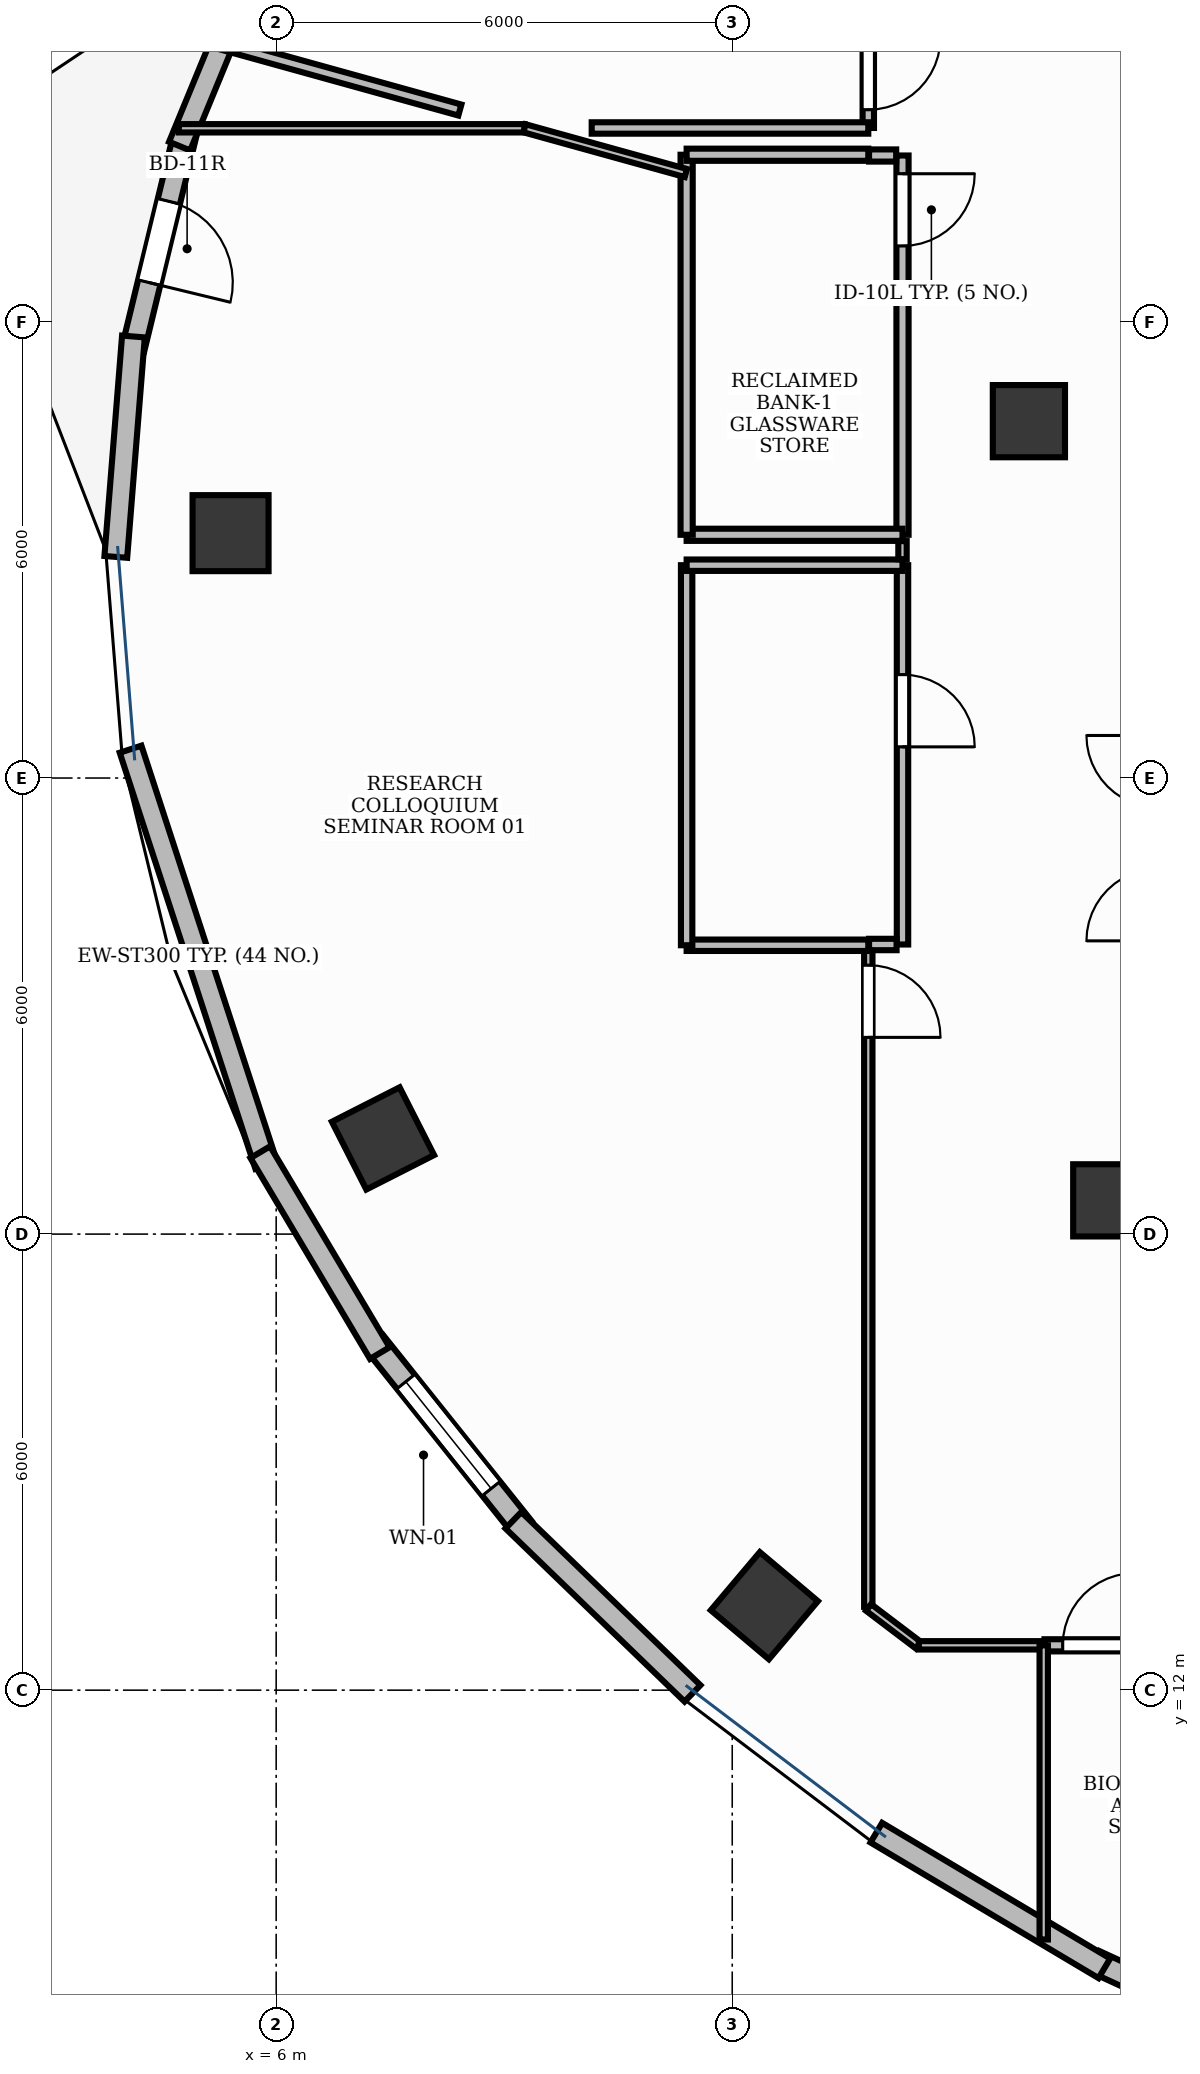
"""IFC4 building model, lengths in metres.
Left out: names, types, materials, properties, quantities, classifications, styles, units other than length and angle.
Written with IfcOpenShell. Run it as: python <this file> out.ifc"""

import sys

from ifc_helpers import new_model, si_unit, direction, frame, frame_2d, origin, origin_2d, place, context, subcontext, project, spatial, rectangle, extrude, element, fill, save


model = new_model("IFC4")
c1 = context("Model", 3, precision=1e-05, world=origin(), true_north=direction((0.0, 1.0)))
c2 = subcontext(c1, "Body", "Model", "MODEL_VIEW")
j1 = project(units=[si_unit("LENGTHUNIT", "METRE"), si_unit("PLANEANGLEUNIT", "RADIAN")], contexts=[c1])
p1 = place(None, origin())
s1 = spatial("IfcSite", under=j1, at=p1, CompositionType="ELEMENT")
p2 = place(p1, origin())
s2 = spatial("IfcBuilding", under=s1, at=p2, CompositionType="ELEMENT")
p3 = place(p2, frame((0.0, 0.0, 231.0)))
s3 = spatial("IfcBuildingStorey", under=s2, at=p3, CompositionType="ELEMENT", Elevation=231.0)
p4 = place(p3, frame((5.4, 27.222, -0.0), z_axis=(0.0, 0.0, 1.0), x_axis=(0.0, 1.0, 0.0)))
e1 = element("IfcColumn", 1, at=p4, inside=s3, PredefinedType="COLUMN", context=c2, shape_type="SweptSolid", body=[
    extrude(rectangle(XDim=1.0, YDim=1.0, at=origin_2d()), origin(), (0.0, 0.0, 1.0), 3.901),
])
p5 = place(p3, frame((15.903, 28.695, -0.0), z_axis=(0.0, 0.0, 1.0), x_axis=(1.0, 0.0, 0.0)))
e2 = element("IfcColumn", 2, at=p5, inside=s3, PredefinedType="COLUMN", context=c2, shape_type="SweptSolid", body=[
    extrude(rectangle(XDim=0.95, YDim=0.95, at=origin_2d()), origin(), (0.0, 0.0, 1.0), 3.901),
])
p6 = place(p3, frame((7.405, 19.259, -0.0), z_axis=(0.0, 0.0, 1.0), x_axis=(-0.453057191132, 0.891481453292, 0.0)))
e3 = element("IfcColumn", 3, at=p6, inside=s3, PredefinedType="COLUMN", context=c2, shape_type="SweptSolid", body=[
    extrude(rectangle(XDim=1.0, YDim=1.0, at=origin_2d()), origin(), (0.0, 0.0, 1.0), 3.901),
])
p7 = place(p3, frame((16.96, 18.444, -0.0), z_axis=(0.0, 0.0, 1.0), x_axis=(1.0, 0.0, 0.0)))
e4 = element("IfcColumn", 4, at=p7, inside=s3, PredefinedType="COLUMN", context=c2, shape_type="SweptSolid", body=[
    extrude(rectangle(XDim=0.95, YDim=0.95, at=origin_2d()), origin(), (0.0, 0.0, 1.0), 3.901),
])
p8 = place(p3, frame((12.423, 13.111, -0.0), z_axis=(0.0, 0.0, 1.0), x_axis=(-0.764246456939, 0.644924300253, 0.0)))
e5 = element("IfcColumn", 5, at=p8, inside=s3, PredefinedType="COLUMN", context=c2, shape_type="SweptSolid", body=[
    extrude(rectangle(XDim=1.0, YDim=1.0, at=origin_2d()), origin(), (0.0, 0.0, 1.0), 3.901),
])
p9 = place(p3, frame((4.8, 32.461, 0.0), z_axis=(0.0, 0.0, 1.0), x_axis=(-0.23549395731, -0.971875813091, 0.0)))
e6 = element("IfcWall", 6, at=p9, inside=s3, PredefinedType="STANDARD", context=c2, shape_type="SweptSolid", body=[
    extrude(rectangle(XDim=2.899, YDim=0.3, at=frame_2d((1.449, 0.0))), origin(), (0.0, 0.0, 1.0), 3.9),
])
p10 = place(p9, frame((0.899, 0.0, 0.0)))
e7 = element("IfcOpeningElement", 7, at=p10, cuts=e6, PredefinedType="OPENING", context=c2, shape_type="SweptSolid", body=[
    extrude(rectangle(XDim=1.1, YDim=2.15, at=frame_2d((0.55, 1.075))), frame((0.0, 0.165, 0.0), z_axis=(0.0, -1.0, 0.0), x_axis=(1.0, 0.0, 0.0)), (0.0, 0.0, 1.0), 0.33),
])
p11 = place(p3, frame((7.29, 16.579, 0.0), z_axis=(0.0, 0.0, 1.0), x_axis=(0.624095877763, -0.781347768512, 0.0)))
e8 = element("IfcWall", 8, at=p11, inside=s3, PredefinedType="STANDARD", context=c2, shape_type="SweptSolid", body=[
    extrude(rectangle(XDim=3.132, YDim=0.3, at=frame_2d((1.566, 0.0))), origin(), (0.0, 0.0, 1.0), 3.9),
])
p12 = place(p11, frame((0.666, 0.0, 0.9)))
e9 = element("IfcOpeningElement", 9, at=p12, cuts=e8, PredefinedType="OPENING", context=c2, shape_type="SweptSolid", body=[
    extrude(rectangle(XDim=1.8, YDim=2.1, at=frame_2d((0.9, 1.05))), frame((0.0, 0.165, 0.0), z_axis=(0.0, -1.0, 0.0), x_axis=(1.0, 0.0, 0.0)), (0.0, 0.0, 1.0), 0.33),
])
p13 = place(p3, frame((16.768, 8.432, 0.0), z_axis=(0.0, 0.0, 1.0), x_axis=(0.908478431596, -0.41793174003, 0.0)))
e10 = element("IfcWall", 10, at=p13, inside=s3, PredefinedType="STANDARD", context=c2, shape_type="SweptSolid", body=[
    extrude(rectangle(XDim=3.547, YDim=0.3, at=frame_2d((1.773, 0.0))), origin(), (0.0, 0.0, 1.0), 3.9),
])
p14 = place(p13, frame((1.534, 0.0, 0.9)))
e11 = element("IfcOpeningElement", 11, at=p14, cuts=e10, PredefinedType="OPENING", context=c2, shape_type="SweptSolid", body=[
    extrude(rectangle(XDim=1.8, YDim=2.1, at=frame_2d((0.9, 1.05))), frame((0.0, 0.165, 0.0), z_axis=(0.0, -1.0, 0.0), x_axis=(1.0, 0.0, 0.0)), (0.0, 0.0, 1.0), 0.33),
])
p15 = place(p3, frame((5.871, 35.083, 0.0), z_axis=(0.0, 0.0, 1.0), x_axis=(-0.380967021775, -0.924588626536, 0.0)))
e12 = element("IfcWall", 12, at=p15, inside=s3, PredefinedType="STANDARD", context=c2, shape_type="SweptSolid", body=[
    extrude(rectangle(XDim=2.996, YDim=0.3, at=frame_2d((1.498, 0.0))), origin(), (0.0, 0.0, 1.0), 3.9),
])
p16 = place(p3, frame((4.122, 29.809, 0.0), z_axis=(0.0, 0.0, 1.0), x_axis=(-0.079738550157, -0.996815812284, 0.0)))
e13 = element("IfcWall", 13, at=p16, inside=s3, PredefinedType="STANDARD", context=c2, shape_type="SweptSolid", body=[
    extrude(rectangle(XDim=2.909, YDim=0.3, at=frame_2d((1.454, 0.0))), origin(), (0.0, 0.0, 1.0), 3.9),
])
p17 = place(p3, frame((4.084, 24.379, 0.0), z_axis=(0.0, 0.0, 1.0), x_axis=(0.309937285623, -0.95075700312, 0.0)))
e14 = element("IfcWall", 14, at=p17, inside=s3, PredefinedType="STANDARD", context=c2, shape_type="SweptSolid", body=[
    extrude(rectangle(XDim=5.758, YDim=0.3, at=frame_2d((2.879, 0.0))), origin(), (0.0, 0.0, 1.0), 3.9),
])
p18 = place(p3, frame((5.791, 19.078, 0.0), z_axis=(0.0, 0.0, 1.0), x_axis=(0.511305212285, -0.85939919705, 0.0)))
e15 = element("IfcWall", 15, at=p18, inside=s3, PredefinedType="STANDARD", context=c2, shape_type="SweptSolid", body=[
    extrude(rectangle(XDim=3.075, YDim=0.3, at=frame_2d((1.538, 0.0))), origin(), (0.0, 0.0, 1.0), 3.47),
])
p19 = place(p3, frame((9.121, 14.235, 0.0), z_axis=(0.0, 0.0, 1.0), x_axis=(0.718999544538, -0.695010543052, 0.0)))
e16 = element("IfcWall", 16, at=p19, inside=s3, PredefinedType="STANDARD", context=c2, shape_type="SweptSolid", body=[
    extrude(rectangle(XDim=3.277, YDim=0.3, at=frame_2d((1.639, 0.0))), origin(), (0.0, 0.0, 1.0), 3.47),
])
p20 = place(p3, frame((13.896, 10.125, 0.0), z_axis=(0.0, 0.0, 1.0), x_axis=(0.859467780744, -0.511189919563, 0.0)))
e17 = element("IfcWall", 17, at=p20, inside=s3, PredefinedType="STANDARD", context=c2, shape_type="SweptSolid", body=[
    extrude(rectangle(XDim=3.49, YDim=0.3, at=frame_2d((1.745, 0.0))), origin(), (0.0, 0.0, 1.0), 3.9),
])
p21 = place(p3, frame((14.24, 26.8, 0.0), z_axis=(0.0, 0.0, 1.0), x_axis=(0.0, -1.0, 0.0)))
e18 = element("IfcWall", 18, at=p21, inside=s3, PredefinedType="PARTITIONING", context=c2, shape_type="SweptSolid", body=[
    extrude(rectangle(XDim=4.99, YDim=0.15, at=frame_2d((2.495, 0.0))), origin(), (0.0, 0.0, 1.0), 2.91),
])
p22 = place(p21, frame((1.44, 0.0, 0.0)))
e19 = element("IfcOpeningElement", 19, at=p22, cuts=e18, PredefinedType="OPENING", context=c2, shape_type="SweptSolid", body=[
    extrude(rectangle(XDim=0.95, YDim=2.15, at=frame_2d((0.475, 1.075))), frame((0.0, 0.09, 0.0), z_axis=(0.0, -1.0, 0.0), x_axis=(1.0, 0.0, 0.0)), (0.0, 0.0, 1.0), 0.18),
])
p23 = place(p3, frame((14.24, 32.19, 0.0), z_axis=(0.0, 0.0, 1.0), x_axis=(0.0, -1.0, 0.0)))
e20 = element("IfcWall", 20, at=p23, inside=s3, PredefinedType="PARTITIONING", context=c2, shape_type="SweptSolid", body=[
    extrude(rectangle(XDim=4.99, YDim=0.16, at=frame_2d((2.495, 0.0))), origin(), (0.0, 0.0, 1.0), 2.91),
])
p24 = place(p23, frame((0.24, 0.0, 0.0)))
e21 = element("IfcOpeningElement", 21, at=p24, cuts=e20, PredefinedType="OPENING", context=c2, shape_type="SweptSolid", body=[
    extrude(rectangle(XDim=0.95, YDim=2.15, at=frame_2d((0.475, 1.075))), frame((0.0, 0.095, 0.0), z_axis=(0.0, -1.0, 0.0), x_axis=(1.0, 0.0, 0.0)), (0.0, 0.0, 1.0), 0.19),
])
p25 = place(p3, frame((13.79, 21.79, 0.0), z_axis=(0.0, 0.0, 1.0), x_axis=(0.0, -1.0, 0.0)))
e22 = element("IfcWall", 22, at=p25, inside=s3, PredefinedType="MOVABLE", context=c2, shape_type="SweptSolid", body=[
    extrude(rectangle(XDim=8.694, YDim=0.11, at=frame_2d((4.347, 0.0))), origin(), (0.0, 0.0, 1.0), 2.91),
])
p26 = place(p25, frame((0.252, 0.0, 0.0)))
e23 = element("IfcOpeningElement", 23, at=p26, cuts=e22, PredefinedType="OPENING", context=c2, shape_type="SweptSolid", body=[
    extrude(rectangle(XDim=0.95, YDim=2.15, at=frame_2d((0.475, 1.075))), frame((0.0, 0.07, 0.0), z_axis=(0.0, -1.0, 0.0), x_axis=(1.0, 0.0, 0.0)), (0.0, 0.0, 1.0), 0.14),
])
p27 = place(p3, frame((16.108, 12.59, 0.0), z_axis=(0.0, 0.0, 1.0), x_axis=(1.0, 0.0, 0.0)))
e24 = element("IfcWall", 24, at=p27, inside=s3, PredefinedType="PARTITIONING", context=c2, shape_type="SweptSolid", body=[
    extrude(rectangle(XDim=4.58, YDim=0.16, at=frame_2d((2.29, 0.0))), origin(), (0.0, 0.0, 1.0), 2.91),
])
p28 = place(p27, frame((0.24, 0.0, 0.0)))
e25 = element("IfcOpeningElement", 25, at=p28, cuts=e24, PredefinedType="OPENING", context=c2, shape_type="SweptSolid", body=[
    extrude(rectangle(XDim=0.95, YDim=2.15, at=frame_2d((0.475, 1.075))), frame((0.0, 0.095, 0.0), z_axis=(0.0, -1.0, 0.0), x_axis=(1.0, 0.0, 0.0)), (0.0, 0.0, 1.0), 0.19),
])
p29 = place(p3, frame((13.79, 37.0, 0.0), z_axis=(0.0, 0.0, 1.0), x_axis=(0.0, -1.0, 0.0)))
e26 = element("IfcWall", 26, at=p29, inside=s3, PredefinedType="PARTITIONING", context=c2, shape_type="SweptSolid", body=[
    extrude(rectangle(XDim=4.448, YDim=0.15, at=frame_2d((2.224, 0.0))), origin(), (0.0, 0.0, 1.0), 2.91),
])
p30 = place(p29, frame((3.258, 0.0, 0.0)))
e27 = element("IfcOpeningElement", 27, at=p30, cuts=e26, PredefinedType="OPENING", context=c2, shape_type="SweptSolid", body=[
    extrude(rectangle(XDim=0.95, YDim=2.15, at=frame_2d((0.475, 1.075))), frame((0.0, 0.09, 0.0), z_axis=(0.0, -1.0, 0.0), x_axis=(1.0, 0.0, 0.0)), (0.0, 0.0, 1.0), 0.18),
])
p31 = place(p3, frame((14.162, 21.81, 0.0), z_axis=(0.0, 0.0, 1.0), x_axis=(-1.0, 0.0, 0.0)))
e28 = element("IfcWall", 28, at=p31, inside=s3, PredefinedType="PARTITIONING", context=c2, shape_type="SweptSolid", body=[
    extrude(rectangle(XDim=0.362, YDim=0.15, at=frame_2d((0.181, 0.0))), origin(), (0.0, 0.0, 1.0), 2.91),
])
p32 = place(p3, frame((13.79, 21.8, 0.0), z_axis=(0.0, 0.0, 1.0), x_axis=(-1.0, 0.0, 0.0)))
e29 = element("IfcWall", 29, at=p32, inside=s3, PredefinedType="PARTITIONING", context=c2, shape_type="SweptSolid", body=[
    extrude(rectangle(XDim=2.39, YDim=0.15, at=frame_2d((1.195, 0.0))), origin(), (0.0, 0.0, 1.0), 2.91),
])
p33 = place(p3, frame((11.4, 21.8, 0.0), z_axis=(0.0, 0.0, 1.0), x_axis=(0.0, 1.0, 0.0)))
e30 = element("IfcWall", 30, at=p33, inside=s3, PredefinedType="PARTITIONING", context=c2, shape_type="SweptSolid", body=[
    extrude(rectangle(XDim=5.0, YDim=0.15, at=frame_2d((2.5, 0.0))), origin(), (0.0, 0.0, 1.0), 2.91),
])
p34 = place(p3, frame((11.4, 26.8, 0.0), z_axis=(0.0, 0.0, 1.0), x_axis=(1.0, 0.0, 0.0)))
e31 = element("IfcWall", 31, at=p34, inside=s3, PredefinedType="PARTITIONING", context=c2, shape_type="SweptSolid", body=[
    extrude(rectangle(XDim=2.84, YDim=0.15, at=frame_2d((1.42, 0.0))), origin(), (0.0, 0.0, 1.0), 2.91),
])
p35 = place(p3, frame((13.8, 32.19, 0.0), z_axis=(0.0, 0.0, 1.0), x_axis=(1.0, 0.0, 0.0)))
e32 = element("IfcWall", 32, at=p35, inside=s3, PredefinedType="PARTITIONING", context=c2, shape_type="SweptSolid", body=[
    extrude(rectangle(XDim=0.357, YDim=0.16, at=frame_2d((0.178, 0.0))), origin(), (0.0, 0.0, 1.0), 2.91),
])
p36 = place(p3, frame((14.24, 27.2, 0.0), z_axis=(0.0, 0.0, 1.0), x_axis=(-1.0, 0.0, 0.0)))
e33 = element("IfcWall", 33, at=p36, inside=s3, PredefinedType="PARTITIONING", context=c2, shape_type="SweptSolid", body=[
    extrude(rectangle(XDim=2.84, YDim=0.16, at=frame_2d((1.42, 0.0))), origin(), (0.0, 0.0, 1.0), 2.91),
])
p37 = place(p3, frame((11.4, 27.2, 0.0), z_axis=(0.0, 0.0, 1.0), x_axis=(0.0, 1.0, 0.0)))
e34 = element("IfcWall", 34, at=p37, inside=s3, PredefinedType="PARTITIONING", context=c2, shape_type="SweptSolid", body=[
    extrude(rectangle(XDim=5.0, YDim=0.16, at=frame_2d((2.5, 0.0))), origin(), (0.0, 0.0, 1.0), 2.91),
])
p38 = place(p3, frame((11.4, 32.2, 0.0), z_axis=(0.0, 0.0, 1.0), x_axis=(1.0, 0.0, 0.0)))
e35 = element("IfcWall", 35, at=p38, inside=s3, PredefinedType="PARTITIONING", context=c2, shape_type="SweptSolid", body=[
    extrude(rectangle(XDim=2.39, YDim=0.16, at=frame_2d((1.195, 0.0))), origin(), (0.0, 0.0, 1.0), 2.91),
])
p39 = place(p3, frame((4.719, 32.548, 0.0), z_axis=(0.0, 0.0, 1.0), x_axis=(1.0, 0.0, 0.0)))
e36 = element("IfcWall", 36, at=p39, inside=s3, PredefinedType="MOVABLE", context=c2, shape_type="SweptSolid", body=[
    extrude(rectangle(XDim=4.548, YDim=0.11, at=frame_2d((2.274, 0.0))), origin(), (0.0, 0.0, 1.0), 2.91),
])
p40 = place(p3, frame((9.267, 32.548, 0.0), z_axis=(0.0, 0.0, 1.0), x_axis=(0.963603606823, -0.267335162141, 0.0)))
e37 = element("IfcWall", 37, at=p40, inside=s3, PredefinedType="MOVABLE", context=c2, shape_type="SweptSolid", body=[
    extrude(rectangle(XDim=2.203, YDim=0.11, at=frame_2d((1.101, 0.0))), origin(), (0.0, 0.0, 1.0), 2.91),
])
p41 = place(p3, frame((14.24, 27.117, 0.0), z_axis=(0.0, 0.0, 1.0), x_axis=(0.0, -1.0, 0.0)))
e38 = element("IfcWall", 38, at=p41, inside=s3, PredefinedType="MOVABLE", context=c2, shape_type="SweptSolid", body=[
    extrude(rectangle(XDim=0.239, YDim=0.11, at=frame_2d((0.12, 0.0))), origin(), (0.0, 0.0, 1.0), 2.91),
])
p42 = place(p3, frame((13.794, 13.088, 0.0), z_axis=(0.0, 0.0, 1.0), x_axis=(0.796957719098, -0.604035093326, 0.0)))
e39 = element("IfcWall", 39, at=p42, inside=s3, PredefinedType="MOVABLE", context=c2, shape_type="SweptSolid", body=[
    extrude(rectangle(XDim=0.821, YDim=0.11, at=frame_2d((0.411, 0.0))), origin(), (0.0, 0.0, 1.0), 2.91),
])
p43 = place(p3, frame((14.454, 12.59, 0.0), z_axis=(0.0, 0.0, 1.0), x_axis=(1.0, 0.0, 0.0)))
e40 = element("IfcWall", 40, at=p43, inside=s3, PredefinedType="MOVABLE", context=c2, shape_type="SweptSolid", body=[
    extrude(rectangle(XDim=1.644, YDim=0.11, at=frame_2d((0.822, 0.0))), origin(), (0.0, 0.0, 1.0), 2.91),
])
p44 = place(p3, frame((16.098, 12.59, 0.0), z_axis=(0.0, 0.0, 1.0), x_axis=(0.0, -1.0, 0.0)))
e41 = element("IfcWall", 41, at=p44, inside=s3, PredefinedType="MOVABLE", context=c2, shape_type="SweptSolid", body=[
    extrude(rectangle(XDim=3.87, YDim=0.11, at=frame_2d((1.935, 0.0))), origin(), (0.0, 0.0, 1.0), 2.91),
])
p45 = place(p3, frame((13.79, 32.552, 0.0), z_axis=(0.0, 0.0, 1.0), x_axis=(-1.0, 0.0, 0.0)))
e42 = element("IfcWall", 42, at=p45, inside=s3, PredefinedType="PARTITIONING", context=c2, shape_type="SweptSolid", body=[
    extrude(rectangle(XDim=3.639, YDim=0.15, at=frame_2d((1.82, 0.0))), origin(), (0.0, 0.0, 1.0), 2.91),
])
p46 = place(p3, frame((8.417, 32.788, 0.0), z_axis=(0.0, 0.0, 1.0), x_axis=(-0.963635086901, 0.267221666961, 0.0)))
e43 = element("IfcWall", 43, at=p46, inside=s3, PredefinedType="PARTITIONING", context=c2, shape_type="SweptSolid", body=[
    extrude(rectangle(XDim=3.37, YDim=0.15, at=frame_2d((1.685, 0.0))), origin(), (0.0, 0.0, 1.0), 2.91),
])
p47 = place(p10, origin())
e44 = element("IfcDoor", 44, at=p47, inside=s3, OperationType="SINGLE_SWING_RIGHT", PredefinedType="DOOR", context=c2, shape_type="SweptSolid", body=[
    extrude(rectangle(XDim=1.1, YDim=2.15, at=frame_2d((0.55, 1.075))), frame((0.0, 0.025, 0.0), z_axis=(0.0, -1.0, 0.0), x_axis=(1.0, 0.0, 0.0)), (0.0, 0.0, 1.0), 0.05),
])
fill(e7, e44)
p48 = place(p12, origin())
e45 = element("IfcWindow", 45, at=p48, inside=s3, PartitioningType="SINGLE_PANEL", PredefinedType="WINDOW", context=c2, shape_type="SweptSolid", body=[
    extrude(rectangle(XDim=1.8, YDim=2.1, at=frame_2d((0.9, 1.05))), frame((0.0, 0.03, 0.0), z_axis=(0.0, -1.0, 0.0), x_axis=(1.0, 0.0, 0.0)), (0.0, 0.0, 1.0), 0.06),
])
fill(e9, e45)
p49 = place(p22, origin())
e46 = element("IfcDoor", 46, at=p49, inside=s3, OperationType="SINGLE_SWING_RIGHT", PredefinedType="DOOR", context=c2, shape_type="SweptSolid", body=[
    extrude(rectangle(XDim=0.95, YDim=2.15, at=frame_2d((0.475, 1.075))), frame((0.0, 0.025, 0.0), z_axis=(0.0, -1.0, 0.0), x_axis=(1.0, 0.0, 0.0)), (0.0, 0.0, 1.0), 0.05),
])
fill(e19, e46)
p50 = place(p24, origin())
e47 = element("IfcDoor", 47, at=p50, inside=s3, OperationType="SINGLE_SWING_LEFT", PredefinedType="DOOR", context=c2, shape_type="SweptSolid", body=[
    extrude(rectangle(XDim=0.95, YDim=2.15, at=frame_2d((0.475, 1.075))), frame((0.0, 0.025, 0.0), z_axis=(0.0, -1.0, 0.0), x_axis=(1.0, 0.0, 0.0)), (0.0, 0.0, 1.0), 0.05),
])
fill(e21, e47)
p51 = place(p26, origin())
e48 = element("IfcDoor", 48, at=p51, inside=s3, OperationType="SINGLE_SWING_RIGHT", PredefinedType="DOOR", context=c2, shape_type="SweptSolid", body=[
    extrude(rectangle(XDim=0.95, YDim=2.15, at=frame_2d((0.475, 1.075))), frame((0.0, 0.025, 0.0), z_axis=(0.0, -1.0, 0.0), x_axis=(1.0, 0.0, 0.0)), (0.0, 0.0, 1.0), 0.05),
])
fill(e23, e48)
p52 = place(p28, origin())
e49 = element("IfcDoor", 49, at=p52, inside=s3, OperationType="SINGLE_SWING_RIGHT", PredefinedType="DOOR", context=c2, shape_type="SweptSolid", body=[
    extrude(rectangle(XDim=0.95, YDim=2.15, at=frame_2d((0.475, 1.075))), frame((0.0, 0.025, 0.0), z_axis=(0.0, -1.0, 0.0), x_axis=(1.0, 0.0, 0.0)), (0.0, 0.0, 1.0), 0.05),
])
fill(e25, e49)
p53 = place(p30, origin())
e50 = element("IfcDoor", 50, at=p53, inside=s3, OperationType="SINGLE_SWING_LEFT", PredefinedType="DOOR", context=c2, shape_type="SweptSolid", body=[
    extrude(rectangle(XDim=0.95, YDim=2.15, at=frame_2d((0.475, 1.075))), frame((0.0, 0.025, 0.0), z_axis=(0.0, -1.0, 0.0), x_axis=(1.0, 0.0, 0.0)), (0.0, 0.0, 1.0), 0.05),
])
fill(e27, e50)
save(model, sys.argv[1])
